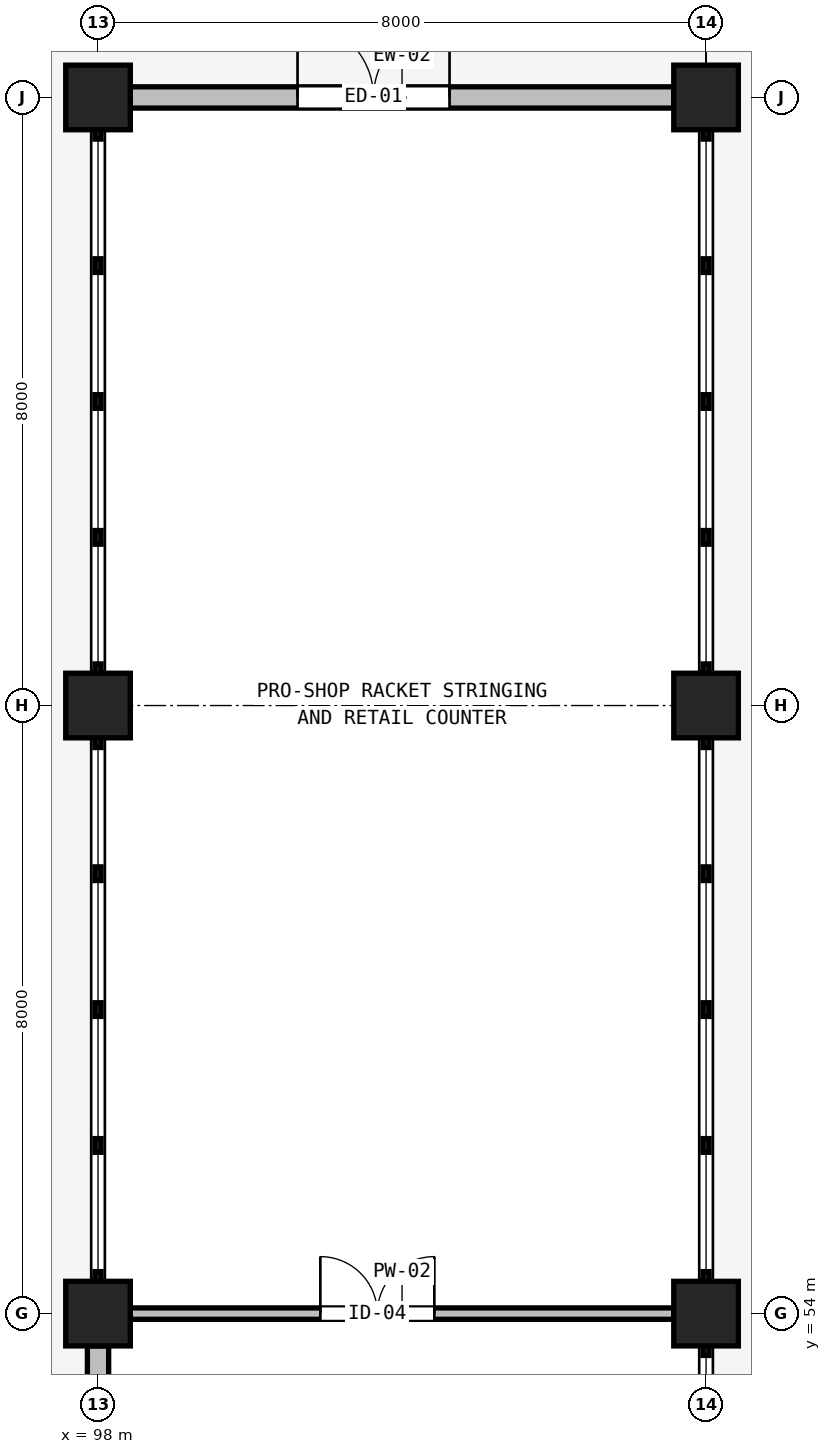
"""IFC4 building model, lengths in metres.
Left out: names, types, materials, properties, quantities, classifications, styles, units other than length and angle.
Written with IfcOpenShell. Run it as: python <this file> out.ifc"""

import sys

from ifc_helpers import new_model, si_unit, direction, frame, frame_2d, origin, origin_2d, place, context, subcontext, project, spatial, rectangle, circle, extrude, element, fill, save


model = new_model("IFC4")
c1 = context("Model", 3, precision=1e-05, world=origin(), true_north=direction((0.0, 1.0)))
c2 = subcontext(c1, "Body", "Model", "MODEL_VIEW")
j1 = project(units=[si_unit("LENGTHUNIT", "METRE"), si_unit("PLANEANGLEUNIT", "RADIAN")], contexts=[c1])
p1 = place(None, origin())
s1 = spatial("IfcSite", under=j1, at=p1, CompositionType="ELEMENT")
p2 = place(p1, origin())
s2 = spatial("IfcBuilding", under=s1, at=p2, CompositionType="ELEMENT")
p3 = place(p2, origin())
s3 = spatial("IfcBuildingStorey", under=s2, at=p3, CompositionType="ELEMENT", Elevation=0.0)
for number, where, z_axis, x_axis in (
    (1, (98.0, 54.0, 0.0), (0.0, 0.0, 1.0), (1.0, 0.0, 0.0)),
    (2, (98.0, 62.0, 0.0), (0.0, 0.0, 1.0), (1.0, 0.0, 0.0)),
    (3, (98.0, 70.0, 0.0), (0.0, 0.0, 1.0), (1.0, 0.0, 0.0)),
    (4, (106.0, 54.0, 0.0), (0.0, 0.0, 1.0), (1.0, 0.0, 0.0)),
    (5, (106.0, 62.0, 0.0), (0.0, 0.0, 1.0), (1.0, 0.0, 0.0)),
    (6, (106.0, 70.0, 0.0), (0.0, 0.0, 1.0), (1.0, 0.0, 0.0)),
):
    element("IfcColumn", number, at=place(p3, frame(where, z_axis=z_axis, x_axis=x_axis)), inside=s3, PredefinedType="COLUMN", context=c2, shape_type="SweptSolid", body=[
        extrude(circle(Radius=0.425, at=origin_2d()), origin(), (0.0, 0.0, 1.0), 5.4),
    ])
p4 = place(p3, frame((98.425, 70.0, 0.0), z_axis=(0.0, 0.0, 1.0), x_axis=(1.0, 0.0, 0.0)))
e7 = element("IfcWall", 7, at=p4, inside=s3, PredefinedType="SOLIDWALL", context=c2, shape_type="SweptSolid", body=[
    extrude(rectangle(XDim=7.15, YDim=0.28, at=frame_2d((3.575, 0.0))), origin(), (0.0, 0.0, 1.0), 4.19),
])
p5 = place(p4, frame((2.2, 0.0, 0.0)))
e8 = element("IfcOpeningElement", 8, at=p5, cuts=e7, PredefinedType="OPENING", context=c2, shape_type="SweptSolid", body=[
    extrude(rectangle(XDim=2.0, YDim=2.4, at=frame_2d((1.0, 1.2))), frame((0.0, 0.15, 0.0), z_axis=(0.0, -1.0, 0.0), x_axis=(1.0, 0.0, 0.0)), (0.0, 0.0, 1.0), 0.3),
])
p6 = place(p3, frame((98.0, 46.425, 0.0), z_axis=(0.0, 0.0, 1.0), x_axis=(0.0, 1.0, 0.0)))
e9 = element("IfcWall", 9, at=p6, inside=s3, PredefinedType="SOLIDWALL", context=c2, shape_type="SweptSolid", body=[
    extrude(rectangle(XDim=7.15, YDim=0.28, at=frame_2d((3.575, 0.0))), origin(), (0.0, 0.0, 1.0), 4.14),
])
p7 = place(p6, frame((2.0, 0.0, 0.0)))
e10 = element("IfcOpeningElement", 10, at=p7, cuts=e9, PredefinedType="OPENING", context=c2, shape_type="SweptSolid", body=[
    extrude(rectangle(XDim=2.4, YDim=2.4, at=frame_2d((1.2, 1.2))), frame((0.0, 0.15, 0.0), z_axis=(0.0, -1.0, 0.0), x_axis=(1.0, 0.0, 0.0)), (0.0, 0.0, 1.0), 0.3),
])
p8 = place(p3, frame((98.425, 54.0, 0.0), z_axis=(0.0, 0.0, 1.0), x_axis=(1.0, 0.0, 0.0)))
e11 = element("IfcWall", 11, at=p8, inside=s3, PredefinedType="PARTITIONING", context=c2, shape_type="SweptSolid", body=[
    extrude(rectangle(XDim=7.15, YDim=0.15, at=frame_2d((3.575, 0.0))), origin(), (0.0, 0.0, 1.0), 4.14),
])
p9 = place(p8, frame((2.5, 0.0, 0.0)))
e12 = element("IfcOpeningElement", 12, at=p9, cuts=e11, PredefinedType="OPENING", context=c2, shape_type="SweptSolid", body=[
    extrude(rectangle(XDim=1.5, YDim=2.2, at=frame_2d((0.75, 1.1))), frame((0.0, 0.085, 0.0), z_axis=(0.0, -1.0, 0.0), x_axis=(1.0, 0.0, 0.0)), (0.0, 0.0, 1.0), 0.17),
])
p10 = place(p5, origin())
e13 = element("IfcDoor", 13, at=p10, inside=s3, OperationType="DOUBLE_DOOR_SINGLE_SWING", PredefinedType="DOOR", context=c2, shape_type="SweptSolid", body=[
    extrude(rectangle(XDim=2.0, YDim=2.4, at=frame_2d((1.0, 1.2))), frame((0.0, 0.025, 0.0), z_axis=(0.0, -1.0, 0.0), x_axis=(1.0, 0.0, 0.0)), (0.0, 0.0, 1.0), 0.05),
])
fill(e8, e13)
p11 = place(p9, origin())
e14 = element("IfcDoor", 14, at=p11, inside=s3, OperationType="DOUBLE_DOOR_SINGLE_SWING", PredefinedType="DOOR", context=c2, shape_type="SweptSolid", body=[
    extrude(rectangle(XDim=1.5, YDim=2.2, at=frame_2d((0.75, 1.1))), frame((0.0, 0.025, 0.0), z_axis=(0.0, -1.0, 0.0), x_axis=(1.0, 0.0, 0.0)), (0.0, 0.0, 1.0), 0.05),
])
fill(e12, e14)
save(model, sys.argv[1])
